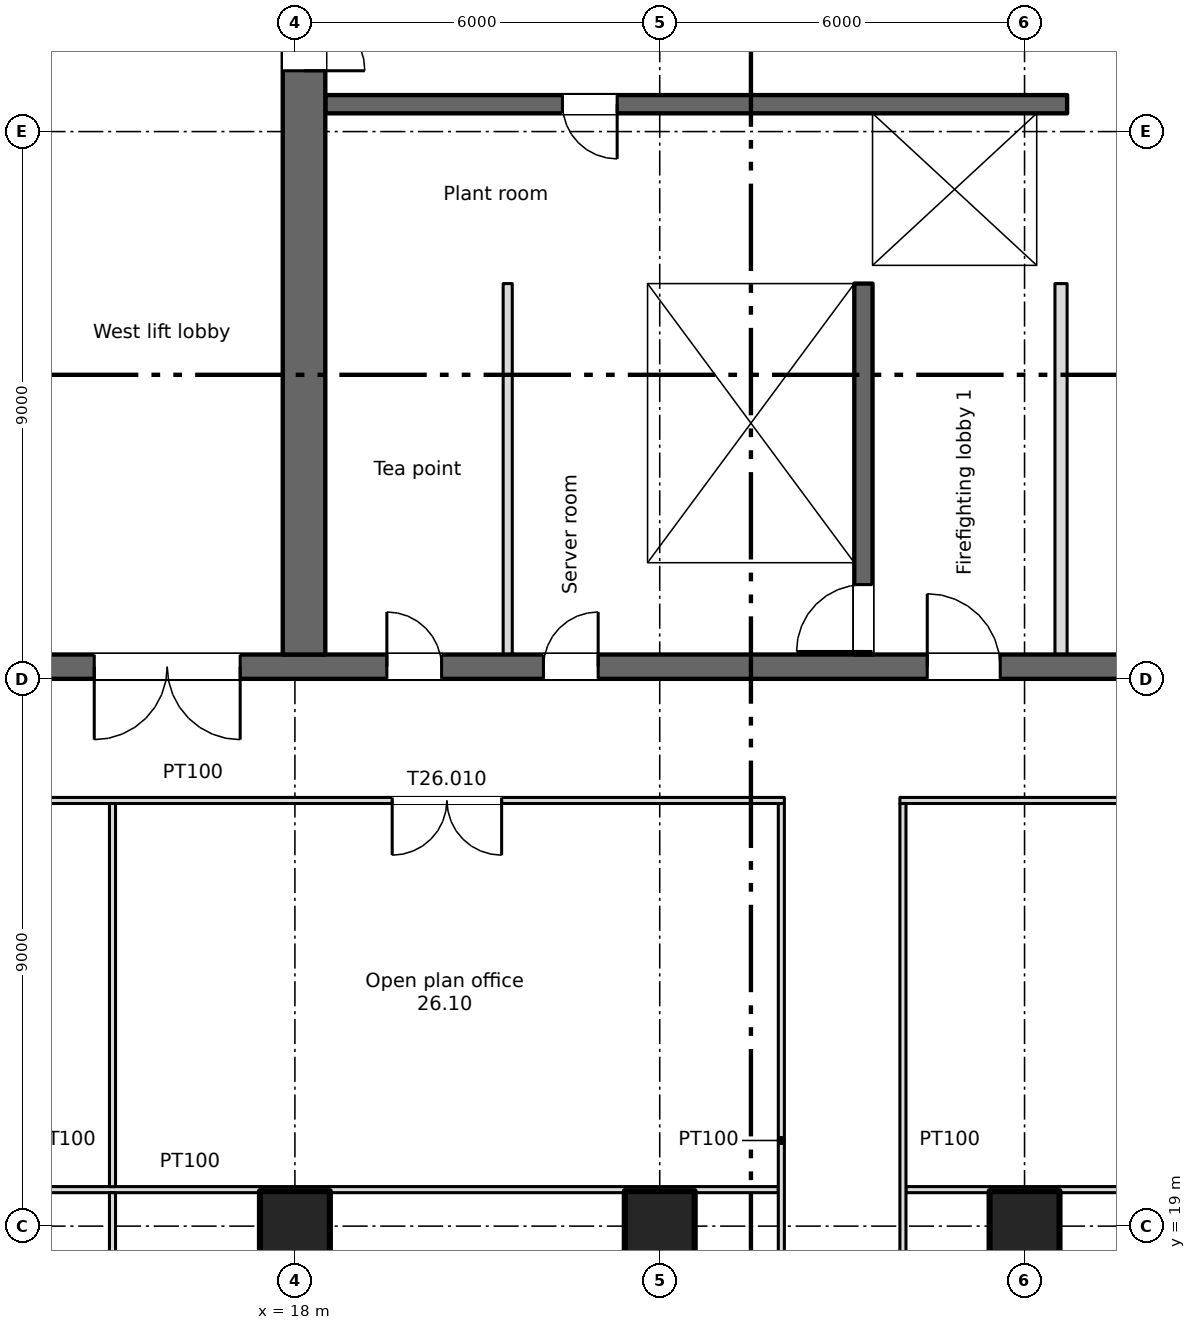
"""IFC4 building model, lengths in metres.
Left out: names, types, materials, properties, quantities, classifications, styles, units other than length and angle.
Written with IfcOpenShell. Run it as: python <this file> out.ifc"""

import sys

from ifc_helpers import new_model, si_unit, direction, frame, frame_2d, origin, origin_2d, place, context, subcontext, project, spatial, rectangle, extrude, element, fill, save


model = new_model("IFC4")
c1 = context("Model", 3, precision=1e-05, world=origin(), true_north=direction((0.0, 1.0)))
c2 = subcontext(c1, "Body", "Model", "MODEL_VIEW")
j1 = project(units=[si_unit("LENGTHUNIT", "METRE"), si_unit("PLANEANGLEUNIT", "RADIAN")], contexts=[c1])
p1 = place(None, origin())
s1 = spatial("IfcSite", under=j1, at=p1, CompositionType="ELEMENT")
p2 = place(p1, origin())
s2 = spatial("IfcBuilding", under=s1, at=p2, CompositionType="ELEMENT")
p3 = place(p2, frame((0.0, 0.0, 181.75)))
s3 = spatial("IfcBuildingStorey", under=s2, at=p3, CompositionType="ELEMENT", Elevation=181.75)
for number, where, z_axis, x_axis in (
    (1, (18.0, 19.0, 0.0), (0.0, 0.0, 1.0), (1.0, 0.0, 0.0)),
    (2, (24.0, 19.0, 0.0), (0.0, 0.0, 1.0), (1.0, 0.0, 0.0)),
    (3, (30.0, 19.0, 0.0), (0.0, 0.0, 1.0), (1.0, 0.0, 0.0)),
):
    element("IfcColumn", number, at=place(p3, frame(where, z_axis=z_axis, x_axis=x_axis)), inside=s3, PredefinedType="COLUMN", context=c2, shape_type="SweptSolid", body=[
        extrude(rectangle(XDim=1.15, YDim=1.15, at=origin_2d()), origin(), (0.0, 0.0, 1.0), 3.35),
    ])
p4 = place(p3, frame((6.6, 28.2, 0.0), z_axis=(0.0, 0.0, 1.0), x_axis=(1.0, 0.0, 0.0)))
e4 = element("IfcWall", 4, at=p4, inside=s3, PredefinedType="SHEAR", context=c2, shape_type="SweptSolid", body=[
    extrude(rectangle(XDim=57.9, YDim=0.4, at=frame_2d((28.95, 0.0))), origin(), (0.0, 0.0, 1.0), 3.35),
])
p5 = place(p4, frame((12.913, 0.0, 0.0)))
e5 = element("IfcOpeningElement", 5, at=p5, cuts=e4, PredefinedType="OPENING", context=c2, shape_type="SweptSolid", body=[
    extrude(rectangle(XDim=0.9, YDim=2.1, at=frame_2d((0.45, 1.05))), frame((0.0, 0.21, 0.0), z_axis=(0.0, -1.0, 0.0), x_axis=(1.0, 0.0, 0.0)), (0.0, 0.0, 1.0), 0.42),
])
p6 = place(p4, frame((15.488, 0.0, 0.0)))
e6 = element("IfcOpeningElement", 6, at=p6, cuts=e4, PredefinedType="OPENING", context=c2, shape_type="SweptSolid", body=[
    extrude(rectangle(XDim=0.9, YDim=2.1, at=frame_2d((0.45, 1.05))), frame((0.0, 0.21, 0.0), z_axis=(0.0, -1.0, 0.0), x_axis=(1.0, 0.0, 0.0)), (0.0, 0.0, 1.0), 0.42),
])
p7 = place(p4, frame((48.413, 0.0, 0.0)))
e7 = element("IfcOpeningElement", 7, at=p7, cuts=e4, PredefinedType="OPENING", context=c2, shape_type="SweptSolid", body=[
    extrude(rectangle(XDim=0.9, YDim=2.1, at=frame_2d((0.45, 1.05))), frame((0.0, 0.21, 0.0), z_axis=(0.0, -1.0, 0.0), x_axis=(1.0, 0.0, 0.0)), (0.0, 0.0, 1.0), 0.42),
])
p8 = place(p4, frame((50.988, 0.0, 0.0)))
e8 = element("IfcOpeningElement", 8, at=p8, cuts=e4, PredefinedType="OPENING", context=c2, shape_type="SweptSolid", body=[
    extrude(rectangle(XDim=0.9, YDim=2.1, at=frame_2d((0.45, 1.05))), frame((0.0, 0.21, 0.0), z_axis=(0.0, -1.0, 0.0), x_axis=(1.0, 0.0, 0.0)), (0.0, 0.0, 1.0), 0.42),
])
p9 = place(p4, frame((0.663, 0.0, 0.0)))
e9 = element("IfcOpeningElement", 9, at=p9, cuts=e4, PredefinedType="OPENING", context=c2, shape_type="SweptSolid", body=[
    extrude(rectangle(XDim=0.9, YDim=2.1, at=frame_2d((0.45, 1.05))), frame((0.0, 0.21, 0.0), z_axis=(0.0, -1.0, 0.0), x_axis=(1.0, 0.0, 0.0)), (0.0, 0.0, 1.0), 0.42),
])
p10 = place(p4, frame((2.238, 0.0, 0.0)))
e10 = element("IfcOpeningElement", 10, at=p10, cuts=e4, PredefinedType="OPENING", context=c2, shape_type="SweptSolid", body=[
    extrude(rectangle(XDim=0.9, YDim=2.1, at=frame_2d((0.45, 1.05))), frame((0.0, 0.21, 0.0), z_axis=(0.0, -1.0, 0.0), x_axis=(1.0, 0.0, 0.0)), (0.0, 0.0, 1.0), 0.42),
])
p11 = place(p4, frame((4.8, 0.0, 0.0)))
e11 = element("IfcOpeningElement", 11, at=p11, cuts=e4, PredefinedType="OPENING", context=c2, shape_type="SweptSolid", body=[
    extrude(rectangle(XDim=1.2, YDim=2.1, at=frame_2d((0.6, 1.05))), frame((0.0, 0.21, 0.0), z_axis=(0.0, -1.0, 0.0), x_axis=(1.0, 0.0, 0.0)), (0.0, 0.0, 1.0), 0.42),
])
p12 = place(p4, frame((31.8, 0.0, 0.0)))
e12 = element("IfcOpeningElement", 12, at=p12, cuts=e4, PredefinedType="OPENING", context=c2, shape_type="SweptSolid", body=[
    extrude(rectangle(XDim=1.2, YDim=2.1, at=frame_2d((0.6, 1.05))), frame((0.0, 0.21, 0.0), z_axis=(0.0, -1.0, 0.0), x_axis=(1.0, 0.0, 0.0)), (0.0, 0.0, 1.0), 0.42),
])
p13 = place(p4, frame((55.3, 0.0, 0.0)))
e13 = element("IfcOpeningElement", 13, at=p13, cuts=e4, PredefinedType="OPENING", context=c2, shape_type="SweptSolid", body=[
    extrude(rectangle(XDim=1.2, YDim=2.1, at=frame_2d((0.6, 1.05))), frame((0.0, 0.21, 0.0), z_axis=(0.0, -1.0, 0.0), x_axis=(1.0, 0.0, 0.0)), (0.0, 0.0, 1.0), 0.42),
])
p14 = place(p4, frame((21.8, 0.0, 0.0)))
e14 = element("IfcOpeningElement", 14, at=p14, cuts=e4, PredefinedType="OPENING", context=c2, shape_type="SweptSolid", body=[
    extrude(rectangle(XDim=1.2, YDim=2.1, at=frame_2d((0.6, 1.05))), frame((0.0, 0.21, 0.0), z_axis=(0.0, -1.0, 0.0), x_axis=(1.0, 0.0, 0.0)), (0.0, 0.0, 1.0), 0.42),
])
p15 = place(p4, frame((41.8, 0.0, 0.0)))
e15 = element("IfcOpeningElement", 15, at=p15, cuts=e4, PredefinedType="OPENING", context=c2, shape_type="SweptSolid", body=[
    extrude(rectangle(XDim=1.2, YDim=2.1, at=frame_2d((0.6, 1.05))), frame((0.0, 0.21, 0.0), z_axis=(0.0, -1.0, 0.0), x_axis=(1.0, 0.0, 0.0)), (0.0, 0.0, 1.0), 0.42),
])
p16 = place(p4, frame((24.95, 0.0, 0.0)))
e16 = element("IfcOpeningElement", 16, at=p16, cuts=e4, PredefinedType="OPENING", context=c2, shape_type="SweptSolid", body=[
    extrude(rectangle(XDim=2.4, YDim=2.1, at=frame_2d((1.2, 1.05))), frame((0.0, 0.21, 0.0), z_axis=(0.0, -1.0, 0.0), x_axis=(1.0, 0.0, 0.0)), (0.0, 0.0, 1.0), 0.42),
])
p17 = place(p4, frame((37.45, 0.0, 0.0)))
e17 = element("IfcOpeningElement", 17, at=p17, cuts=e4, PredefinedType="OPENING", context=c2, shape_type="SweptSolid", body=[
    extrude(rectangle(XDim=2.4, YDim=2.1, at=frame_2d((1.2, 1.05))), frame((0.0, 0.21, 0.0), z_axis=(0.0, -1.0, 0.0), x_axis=(1.0, 0.0, 0.0)), (0.0, 0.0, 1.0), 0.42),
])
p18 = place(p4, frame((8.1, 0.0, 0.0)))
e18 = element("IfcOpeningElement", 18, at=p18, cuts=e4, PredefinedType="OPENING", context=c2, shape_type="SweptSolid", body=[
    extrude(rectangle(XDim=2.4, YDim=2.1, at=frame_2d((1.2, 1.05))), frame((0.0, 0.21, 0.0), z_axis=(0.0, -1.0, 0.0), x_axis=(1.0, 0.0, 0.0)), (0.0, 0.0, 1.0), 0.42),
])
p19 = place(p4, frame((28.95, 0.0, 0.0)))
e19 = element("IfcOpeningElement", 19, at=p19, cuts=e4, PredefinedType="OPENING", context=c2, shape_type="SweptSolid", body=[
    extrude(rectangle(XDim=0.9, YDim=2.1, at=frame_2d((0.45, 1.05))), frame((0.0, 0.21, 0.0), z_axis=(0.0, -1.0, 0.0), x_axis=(1.0, 0.0, 0.0)), (0.0, 0.0, 1.0), 0.42),
])
p20 = place(p4, frame((34.95, 0.0, 0.0)))
e20 = element("IfcOpeningElement", 20, at=p20, cuts=e4, PredefinedType="OPENING", context=c2, shape_type="SweptSolid", body=[
    extrude(rectangle(XDim=0.9, YDim=2.1, at=frame_2d((0.45, 1.05))), frame((0.0, 0.21, 0.0), z_axis=(0.0, -1.0, 0.0), x_axis=(1.0, 0.0, 0.0)), (0.0, 0.0, 1.0), 0.42),
])
p21 = place(p3, frame((18.15, 28.4, 0.0), z_axis=(0.0, 0.0, 1.0), x_axis=(0.0, 1.0, 0.0)))
e21 = element("IfcWall", 21, at=p21, inside=s3, PredefinedType="SHEAR", context=c2, shape_type="SweptSolid", body=[
    extrude(rectangle(XDim=16.9, YDim=0.7, at=frame_2d((8.45, 0.0))), origin(), (0.0, 0.0, 1.0), 3.35),
])
p22 = place(p21, frame((9.6, 0.0, 0.0)))
e22 = element("IfcOpeningElement", 22, at=p22, cuts=e21, PredefinedType="OPENING", context=c2, shape_type="SweptSolid", body=[
    extrude(rectangle(XDim=2.0, YDim=2.1, at=frame_2d((1.0, 1.05))), frame((0.0, 0.36, 0.0), z_axis=(0.0, -1.0, 0.0), x_axis=(1.0, 0.0, 0.0)), (0.0, 0.0, 1.0), 0.72),
])
p23 = place(p21, frame((15.4, 0.0, 0.0)))
e23 = element("IfcOpeningElement", 23, at=p23, cuts=e21, PredefinedType="OPENING", context=c2, shape_type="SweptSolid", body=[
    extrude(rectangle(XDim=1.2, YDim=2.1, at=frame_2d((0.6, 1.05))), frame((0.0, 0.36, 0.0), z_axis=(0.0, -1.0, 0.0), x_axis=(1.0, 0.0, 0.0)), (0.0, 0.0, 1.0), 0.72),
])
for number, where, z_axis, x_axis in (
    (24, (13.85, 28.4, 0.0), (0.0, 0.0, 1.0), (0.0, 1.0, 0.0)),
    (25, (23.65, 28.4, 0.0), (0.0, 0.0, 1.0), (0.0, 1.0, 0.0)),
):
    element("IfcWall", number, at=place(p3, frame(where, z_axis=z_axis, x_axis=x_axis)), inside=s3, PredefinedType="SHEAR", context=c2, shape_type="SweptSolid", body=[
        extrude(rectangle(XDim=6.1, YDim=0.3, at=frame_2d((3.05, 0.0))), origin(), (0.0, 0.0, 1.0), 3.35),
    ])
p24 = place(p3, frame((27.35, 28.4, 0.0), z_axis=(0.0, 0.0, 1.0), x_axis=(0.0, 1.0, 0.0)))
e26 = element("IfcWall", 26, at=p24, inside=s3, PredefinedType="SHEAR", context=c2, shape_type="SweptSolid", body=[
    extrude(rectangle(XDim=6.1, YDim=0.3, at=frame_2d((3.05, 0.0))), origin(), (0.0, 0.0, 1.0), 3.35),
])
p25 = place(p24, frame((0.05, 0.0, 0.0)))
e27 = element("IfcOpeningElement", 27, at=p25, cuts=e26, PredefinedType="OPENING", context=c2, shape_type="SweptSolid", body=[
    extrude(rectangle(XDim=1.1, YDim=2.1, at=frame_2d((0.55, 1.05))), frame((0.0, 0.16, 0.0), z_axis=(0.0, -1.0, 0.0), x_axis=(1.0, 0.0, 0.0)), (0.0, 0.0, 1.0), 0.32),
])
p26 = place(p3, frame((18.5, 34.65, 0.0), z_axis=(0.0, 0.0, 1.0), x_axis=(1.0, 0.0, 0.0)))
e28 = element("IfcWall", 28, at=p26, inside=s3, PredefinedType="SHEAR", context=c2, shape_type="SweptSolid", body=[
    extrude(rectangle(XDim=12.2, YDim=0.3, at=frame_2d((6.1, 0.0))), origin(), (0.0, 0.0, 1.0), 3.35),
])
p27 = place(p26, frame((9.8, 0.0, 0.0)))
e29 = element("IfcOpeningElement", 29, at=p27, cuts=e28, PredefinedType="OPENING", context=c2, shape_type="SweptSolid", body=[
    extrude(rectangle(XDim=1.1, YDim=2.1, at=frame_2d((0.55, 1.05))), frame((0.0, 0.16, 0.0), z_axis=(0.0, -1.0, 0.0), x_axis=(1.0, 0.0, 0.0)), (0.0, 0.0, 1.0), 0.32),
])
p28 = place(p3, frame((30.7, 37.45, 0.0), z_axis=(0.0, 0.0, 1.0), x_axis=(-1.0, 0.0, 0.0)))
e30 = element("IfcWall", 30, at=p28, inside=s3, PredefinedType="SHEAR", context=c2, shape_type="SweptSolid", body=[
    extrude(rectangle(XDim=12.2, YDim=0.3, at=frame_2d((6.1, 0.0))), origin(), (0.0, 0.0, 1.0), 3.35),
])
p29 = place(p28, frame((7.4, 0.0, 0.0)))
e31 = element("IfcOpeningElement", 31, at=p29, cuts=e30, PredefinedType="OPENING", context=c2, shape_type="SweptSolid", body=[
    extrude(rectangle(XDim=0.9, YDim=2.1, at=frame_2d((0.45, 1.05))), frame((0.0, 0.16, 0.0), z_axis=(0.0, -1.0, 0.0), x_axis=(1.0, 0.0, 0.0)), (0.0, 0.0, 1.0), 0.32),
])
p30 = place(p3, frame((27.35, 34.8, 0.0), z_axis=(0.0, 0.0, 1.0), x_axis=(0.0, 1.0, 0.0)))
e32 = element("IfcWall", 32, at=p30, inside=s3, PredefinedType="SHEAR", context=c2, shape_type="SweptSolid", body=[
    extrude(rectangle(XDim=2.5, YDim=0.3, at=frame_2d((1.25, 0.0))), origin(), (0.0, 0.0, 1.0), 3.35),
])
p31 = place(p3, frame((30.45, 34.8, 0.0), z_axis=(0.0, 0.0, 1.0), x_axis=(0.0, 1.0, 0.0)))
e33 = element("IfcWall", 33, at=p31, inside=s3, PredefinedType="SHEAR", context=c2, shape_type="SweptSolid", body=[
    extrude(rectangle(XDim=2.5, YDim=0.5, at=frame_2d((1.25, 0.0))), origin(), (0.0, 0.0, 1.0), 3.35),
])
p32 = place(p3, frame((13.85, 34.8, 0.0), z_axis=(0.0, 0.0, 1.0), x_axis=(0.0, 1.0, 0.0)))
e34 = element("IfcWall", 34, at=p32, inside=s3, PredefinedType="SHEAR", context=c2, shape_type="SweptSolid", body=[
    extrude(rectangle(XDim=2.5, YDim=0.3, at=frame_2d((1.25, 0.0))), origin(), (0.0, 0.0, 1.0), 3.35),
])
p33 = place(p3, frame((30.6, 28.4, 0.0), z_axis=(0.0, 0.0, 1.0), x_axis=(0.0, 1.0, 0.0)))
e35 = element("IfcWall", 35, at=p33, inside=s3, PredefinedType="PARTITIONING", context=c2, shape_type="SweptSolid", body=[
    extrude(rectangle(XDim=6.1, YDim=0.2, at=frame_2d((3.05, 0.0))), origin(), (0.0, 0.0, 1.0), 3.35),
])
p34 = place(p3, frame((21.5, 28.4, 0.0), z_axis=(0.0, 0.0, 1.0), x_axis=(0.0, 1.0, 0.0)))
e36 = element("IfcWall", 36, at=p34, inside=s3, PredefinedType="PARTITIONING", context=c2, shape_type="SweptSolid", body=[
    extrude(rectangle(XDim=6.1, YDim=0.15, at=frame_2d((3.05, 0.0))), origin(), (0.0, 0.0, 1.0), 3.35),
])
p35 = place(p3, frame((6.6, 19.6, 0.0), z_axis=(0.0, 0.0, 1.0), x_axis=(1.0, 0.0, 0.0)))
e37 = element("IfcWall", 37, at=p35, inside=s3, PredefinedType="PARTITIONING", context=c2, shape_type="SweptSolid", body=[
    extrude(rectangle(XDim=19.35, YDim=0.1, at=frame_2d((9.675, 0.0))), origin(), (0.0, 0.0, 1.0), 3.35),
])
p36 = place(p3, frame((28.05, 19.6, 0.0), z_axis=(0.0, 0.0, 1.0), x_axis=(1.0, 0.0, 0.0)))
e38 = element("IfcWall", 38, at=p36, inside=s3, PredefinedType="PARTITIONING", context=c2, shape_type="SweptSolid", body=[
    extrude(rectangle(XDim=21.9, YDim=0.1, at=frame_2d((10.95, 0.0))), origin(), (0.0, 0.0, 1.0), 3.35),
])
p37 = place(p3, frame((6.6, 26.0, 0.0), z_axis=(0.0, 0.0, 1.0), x_axis=(1.0, 0.0, 0.0)))
e39 = element("IfcWall", 39, at=p37, inside=s3, PredefinedType="PARTITIONING", context=c2, shape_type="SweptSolid", body=[
    extrude(rectangle(XDim=19.45, YDim=0.1, at=frame_2d((9.725, 0.0))), origin(), (0.0, 0.0, 1.0), 3.35),
])
p38 = place(p37, frame((3.7, 0.0, 0.0)))
e40 = element("IfcOpeningElement", 40, at=p38, cuts=e39, PredefinedType="OPENING", context=c2, shape_type="SweptSolid", body=[
    extrude(rectangle(XDim=1.0, YDim=2.1, at=frame_2d((0.5, 1.05))), frame((0.0, 0.06, 0.0), z_axis=(0.0, -1.0, 0.0), x_axis=(1.0, 0.0, 0.0)), (0.0, 0.0, 1.0), 0.12),
])
p39 = place(p37, frame((13.0, 0.0, 0.0)))
e41 = element("IfcOpeningElement", 41, at=p39, cuts=e39, PredefinedType="OPENING", context=c2, shape_type="SweptSolid", body=[
    extrude(rectangle(XDim=1.8, YDim=2.1, at=frame_2d((0.9, 1.05))), frame((0.0, 0.06, 0.0), z_axis=(0.0, -1.0, 0.0), x_axis=(1.0, 0.0, 0.0)), (0.0, 0.0, 1.0), 0.12),
])
p40 = place(p3, frame((27.95, 26.0, 0.0), z_axis=(0.0, 0.0, 1.0), x_axis=(1.0, 0.0, 0.0)))
e42 = element("IfcWall", 42, at=p40, inside=s3, PredefinedType="PARTITIONING", context=c2, shape_type="SweptSolid", body=[
    extrude(rectangle(XDim=22.1, YDim=0.1, at=frame_2d((11.05, 0.0))), origin(), (0.0, 0.0, 1.0), 3.35),
])
p41 = place(p40, frame((10.15, 0.0, 0.0)))
e43 = element("IfcOpeningElement", 43, at=p41, cuts=e42, PredefinedType="OPENING", context=c2, shape_type="SweptSolid", body=[
    extrude(rectangle(XDim=1.8, YDim=2.1, at=frame_2d((0.9, 1.05))), frame((0.0, 0.06, 0.0), z_axis=(0.0, -1.0, 0.0), x_axis=(1.0, 0.0, 0.0)), (0.0, 0.0, 1.0), 0.12),
])
p42 = place(p3, frame((15.0, 12.65, 0.0), z_axis=(0.0, 0.0, 1.0), x_axis=(0.0, 1.0, 0.0)))
e44 = element("IfcWall", 44, at=p42, inside=s3, PredefinedType="PARTITIONING", context=c2, shape_type="SweptSolid", body=[
    extrude(rectangle(XDim=6.9, YDim=0.1, at=frame_2d((3.45, 0.0))), origin(), (0.0, 0.0, 1.0), 3.35),
])
p43 = place(p3, frame((15.0, 19.65, 0.0), z_axis=(0.0, 0.0, 1.0), x_axis=(0.0, 1.0, 0.0)))
e45 = element("IfcWall", 45, at=p43, inside=s3, PredefinedType="PARTITIONING", context=c2, shape_type="SweptSolid", body=[
    extrude(rectangle(XDim=6.3, YDim=0.1, at=frame_2d((3.15, 0.0))), origin(), (0.0, 0.0, 1.0), 3.35),
])
for number, where, z_axis, x_axis in (
    (46, (26.0, 12.65, 0.0), (0.0, 0.0, 1.0), (0.0, 1.0, 0.0)),
    (47, (28.0, 12.65, 0.0), (0.0, 0.0, 1.0), (0.0, 1.0, 0.0)),
):
    element("IfcWall", number, at=place(p3, frame(where, z_axis=z_axis, x_axis=x_axis)), inside=s3, PredefinedType="PARTITIONING", context=c2, shape_type="SweptSolid", body=[
        extrude(rectangle(XDim=13.3, YDim=0.1, at=frame_2d((6.65, 0.0))), origin(), (0.0, 0.0, 1.0), 3.35),
    ])
p44 = place(p5, origin())
e48 = element("IfcDoor", 48, at=p44, inside=s3, OperationType="SINGLE_SWING_LEFT", PredefinedType="DOOR", context=c2, shape_type="SweptSolid", body=[
    extrude(rectangle(XDim=0.9, YDim=2.1, at=frame_2d((0.45, 1.05))), frame((0.0, 0.025, 0.0), z_axis=(0.0, -1.0, 0.0), x_axis=(1.0, 0.0, 0.0)), (0.0, 0.0, 1.0), 0.05),
])
fill(e5, e48)
p45 = place(p6, origin())
e49 = element("IfcDoor", 49, at=p45, inside=s3, OperationType="SINGLE_SWING_RIGHT", PredefinedType="DOOR", context=c2, shape_type="SweptSolid", body=[
    extrude(rectangle(XDim=0.9, YDim=2.1, at=frame_2d((0.45, 1.05))), frame((0.0, 0.025, 0.0), z_axis=(0.0, -1.0, 0.0), x_axis=(1.0, 0.0, 0.0)), (0.0, 0.0, 1.0), 0.05),
])
fill(e6, e49)
p46 = place(p29, origin())
e50 = element("IfcDoor", 50, at=p46, inside=s3, OperationType="SINGLE_SWING_LEFT", PredefinedType="DOOR", context=c2, shape_type="SweptSolid", body=[
    extrude(rectangle(XDim=0.9, YDim=2.1, at=frame_2d((0.45, 1.05))), frame((0.0, 0.025, 0.0), z_axis=(0.0, -1.0, 0.0), x_axis=(1.0, 0.0, 0.0)), (0.0, 0.0, 1.0), 0.05),
])
fill(e31, e50)
p47 = place(p27, origin())
e51 = element("IfcDoor", 51, at=p47, inside=s3, OperationType="SLIDING_TO_LEFT", PredefinedType="DOOR", context=c2, shape_type="SweptSolid", body=[
    extrude(rectangle(XDim=1.1, YDim=2.1, at=frame_2d((0.55, 1.05))), frame((0.0, 0.025, 0.0), z_axis=(0.0, -1.0, 0.0), x_axis=(1.0, 0.0, 0.0)), (0.0, 0.0, 1.0), 0.05),
])
fill(e29, e51)
p48 = place(p25, origin())
e52 = element("IfcDoor", 52, at=p48, inside=s3, OperationType="SINGLE_SWING_LEFT", PredefinedType="DOOR", context=c2, shape_type="SweptSolid", body=[
    extrude(rectangle(XDim=1.1, YDim=2.1, at=frame_2d((0.55, 1.05))), frame((0.0, 0.025, 0.0), z_axis=(0.0, -1.0, 0.0), x_axis=(1.0, 0.0, 0.0)), (0.0, 0.0, 1.0), 0.05),
])
fill(e27, e52)
p49 = place(p14, origin())
e53 = element("IfcDoor", 53, at=p49, inside=s3, OperationType="SINGLE_SWING_LEFT", PredefinedType="DOOR", context=c2, shape_type="SweptSolid", body=[
    extrude(rectangle(XDim=1.2, YDim=2.1, at=frame_2d((0.6, 1.05))), frame((0.0, 0.025, 0.0), z_axis=(0.0, -1.0, 0.0), x_axis=(1.0, 0.0, 0.0)), (0.0, 0.0, 1.0), 0.05),
])
fill(e14, e53)
p50 = place(p18, origin())
e54 = element("IfcDoor", 54, at=p50, inside=s3, OperationType="DOUBLE_DOOR_SINGLE_SWING", PredefinedType="DOOR", context=c2, shape_type="SweptSolid", body=[
    extrude(rectangle(XDim=2.4, YDim=2.1, at=frame_2d((1.2, 1.05))), frame((0.0, 0.025, 0.0), z_axis=(0.0, -1.0, 0.0), x_axis=(1.0, 0.0, 0.0)), (0.0, 0.0, 1.0), 0.05),
])
fill(e18, e54)
p51 = place(p22, origin())
e55 = element("IfcDoor", 55, at=p51, inside=s3, OperationType="DOUBLE_DOOR_SINGLE_SWING", PredefinedType="DOOR", context=c2, shape_type="SweptSolid", body=[
    extrude(rectangle(XDim=2.0, YDim=2.1, at=frame_2d((1.0, 1.05))), frame((0.0, 0.025, 0.0), z_axis=(0.0, -1.0, 0.0), x_axis=(1.0, 0.0, 0.0)), (0.0, 0.0, 1.0), 0.05),
])
fill(e22, e55)
p52 = place(p39, origin())
e56 = element("IfcDoor", 56, at=p52, inside=s3, OperationType="DOUBLE_DOOR_SINGLE_SWING", PredefinedType="DOOR", context=c2, shape_type="SweptSolid", body=[
    extrude(rectangle(XDim=1.8, YDim=2.1, at=frame_2d((0.9, 1.05))), frame((0.0, 0.025, 0.0), z_axis=(0.0, -1.0, 0.0), x_axis=(1.0, 0.0, 0.0)), (0.0, 0.0, 1.0), 0.05),
])
fill(e41, e56)
save(model, sys.argv[1])
